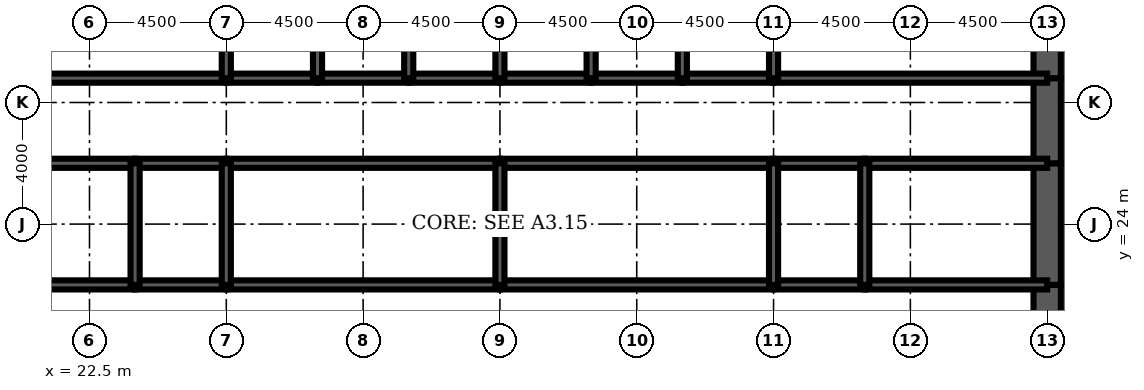
"""IFC4 building model, lengths in metres.
Left out: names, types, materials, properties, quantities, classifications, styles, units other than length and angle.
Written with IfcOpenShell. Run it as: python <this file> out.ifc"""

import sys

from ifc_helpers import new_model, si_unit, direction, frame, frame_2d, origin, place, context, subcontext, project, spatial, rectangle, extrude, element, fill, save


model = new_model("IFC4")
c1 = context("Model", 3, precision=1e-05, world=origin(), true_north=direction((0.0, 1.0)))
c2 = subcontext(c1, "Body", "Model", "MODEL_VIEW")
j1 = project(units=[si_unit("LENGTHUNIT", "METRE"), si_unit("PLANEANGLEUNIT", "RADIAN")], contexts=[c1])
p1 = place(None, origin())
s1 = spatial("IfcSite", under=j1, at=p1, CompositionType="ELEMENT")
p2 = place(p1, origin())
s2 = spatial("IfcBuilding", under=s1, at=p2, CompositionType="ELEMENT")
p3 = place(p2, frame((0.0, 0.0, 63.5)))
s3 = spatial("IfcBuildingStorey", under=s2, at=p3, CompositionType="ELEMENT", Elevation=63.5)
p4 = place(p3, frame((54.0, 19.2, 0.0), z_axis=(0.0, 0.0, 1.0), x_axis=(0.0, 1.0, 0.0)))
e1 = element("IfcWall", 1, at=p4, inside=s3, PredefinedType="SHEAR", context=c2, shape_type="SweptSolid", body=[
    extrude(rectangle(XDim=2.8, YDim=0.9, at=frame_2d((1.4, 0.0))), origin(), (0.0, 0.0, 1.0), 4.5),
])
p5 = place(p4, frame((0.4, 0.0, 0.0)))
e2 = element("IfcOpeningElement", 2, at=p5, cuts=e1, PredefinedType="OPENING", context=c2, shape_type="SweptSolid", body=[
    extrude(rectangle(XDim=1.8, YDim=2.1, at=frame_2d((0.9, 1.05))), frame((0.0, 0.46, 0.0), z_axis=(0.0, -1.0, 0.0), x_axis=(1.0, 0.0, 0.0)), (0.0, 0.0, 1.0), 0.92),
])
p6 = place(p3, frame((54.0, 22.0, 0.0), z_axis=(0.0, 0.0, 1.0), x_axis=(0.0, 1.0, 0.0)))
e3 = element("IfcWall", 3, at=p6, inside=s3, PredefinedType="SHEAR", context=c2, shape_type="SweptSolid", body=[
    extrude(rectangle(XDim=4.0, YDim=0.9, at=frame_2d((2.0, 0.0))), origin(), (0.0, 0.0, 1.0), 4.5),
])
p7 = place(p3, frame((54.0, 26.0, 0.0), z_axis=(0.0, 0.0, 1.0), x_axis=(0.0, 1.0, 0.0)))
e4 = element("IfcWall", 4, at=p7, inside=s3, PredefinedType="SHEAR", context=c2, shape_type="SweptSolid", body=[
    extrude(rectangle(XDim=2.8, YDim=0.9, at=frame_2d((1.4, 0.0))), origin(), (0.0, 0.0, 1.0), 4.5),
])
p8 = place(p7, frame((0.6, 0.0, 0.0)))
e5 = element("IfcOpeningElement", 5, at=p8, cuts=e4, PredefinedType="OPENING", context=c2, shape_type="SweptSolid", body=[
    extrude(rectangle(XDim=1.8, YDim=2.1, at=frame_2d((0.9, 1.05))), frame((0.0, 0.46, 0.0), z_axis=(0.0, -1.0, 0.0), x_axis=(1.0, 0.0, 0.0)), (0.0, 0.0, 1.0), 0.92),
])
p9 = place(p3, frame((54.0, 28.8, 0.0), z_axis=(0.0, 0.0, 1.0), x_axis=(0.0, 1.0, 0.0)))
e6 = element("IfcWall", 6, at=p9, inside=s3, PredefinedType="SHEAR", context=c2, shape_type="SweptSolid", body=[
    extrude(rectangle(XDim=3.2, YDim=0.9, at=frame_2d((1.6, 0.0))), origin(), (0.0, 0.0, 1.0), 4.5),
])
p10 = place(p3, frame((18.0, 28.8, 0.0), z_axis=(0.0, 0.0, 1.0), x_axis=(1.0, 0.0, 0.0)))
e7 = element("IfcWall", 7, at=p10, inside=s3, PredefinedType="SOLIDWALL", context=c2, shape_type="SweptSolid", body=[
    extrude(rectangle(XDim=9.0, YDim=0.3, at=frame_2d((4.5, 0.0))), origin(), (0.0, 0.0, 1.0), 4.5),
])
p11 = place(p10, frame((0.65, 0.0, 0.0)))
e8 = element("IfcOpeningElement", 8, at=p11, cuts=e7, PredefinedType="OPENING", context=c2, shape_type="SweptSolid", body=[
    extrude(rectangle(XDim=1.0, YDim=2.1, at=frame_2d((0.5, 1.05))), frame((0.0, 0.16, 0.0), z_axis=(0.0, -1.0, 0.0), x_axis=(1.0, 0.0, 0.0)), (0.0, 0.0, 1.0), 0.32),
])
p12 = place(p3, frame((27.0, 28.8, 0.0), z_axis=(0.0, 0.0, 1.0), x_axis=(1.0, 0.0, 0.0)))
e9 = element("IfcWall", 9, at=p12, inside=s3, PredefinedType="SOLIDWALL", context=c2, shape_type="SweptSolid", body=[
    extrude(rectangle(XDim=3.0, YDim=0.3, at=frame_2d((1.5, 0.0))), origin(), (0.0, 0.0, 1.0), 4.5),
])
p13 = place(p12, frame((0.95, 0.0, 0.0)))
e10 = element("IfcOpeningElement", 10, at=p13, cuts=e9, PredefinedType="OPENING", context=c2, shape_type="SweptSolid", body=[
    extrude(rectangle(XDim=1.1, YDim=2.2, at=frame_2d((0.55, 1.1))), frame((0.0, 0.16, 0.0), z_axis=(0.0, -1.0, 0.0), x_axis=(1.0, 0.0, 0.0)), (0.0, 0.0, 1.0), 0.32),
])
p14 = place(p3, frame((30.0, 28.8, 0.0), z_axis=(0.0, 0.0, 1.0), x_axis=(1.0, 0.0, 0.0)))
e11 = element("IfcWall", 11, at=p14, inside=s3, PredefinedType="SOLIDWALL", context=c2, shape_type="SweptSolid", body=[
    extrude(rectangle(XDim=3.0, YDim=0.3, at=frame_2d((1.5, 0.0))), origin(), (0.0, 0.0, 1.0), 4.5),
])
p15 = place(p14, frame((0.95, 0.0, 0.0)))
e12 = element("IfcOpeningElement", 12, at=p15, cuts=e11, PredefinedType="OPENING", context=c2, shape_type="SweptSolid", body=[
    extrude(rectangle(XDim=1.1, YDim=2.2, at=frame_2d((0.55, 1.1))), frame((0.0, 0.16, 0.0), z_axis=(0.0, -1.0, 0.0), x_axis=(1.0, 0.0, 0.0)), (0.0, 0.0, 1.0), 0.32),
])
p16 = place(p3, frame((33.0, 28.8, 0.0), z_axis=(0.0, 0.0, 1.0), x_axis=(1.0, 0.0, 0.0)))
e13 = element("IfcWall", 13, at=p16, inside=s3, PredefinedType="SOLIDWALL", context=c2, shape_type="SweptSolid", body=[
    extrude(rectangle(XDim=3.0, YDim=0.3, at=frame_2d((1.5, 0.0))), origin(), (0.0, 0.0, 1.0), 4.5),
])
p17 = place(p16, frame((0.95, 0.0, 0.0)))
e14 = element("IfcOpeningElement", 14, at=p17, cuts=e13, PredefinedType="OPENING", context=c2, shape_type="SweptSolid", body=[
    extrude(rectangle(XDim=1.1, YDim=2.2, at=frame_2d((0.55, 1.1))), frame((0.0, 0.16, 0.0), z_axis=(0.0, -1.0, 0.0), x_axis=(1.0, 0.0, 0.0)), (0.0, 0.0, 1.0), 0.32),
])
for number, where, z_axis, x_axis in (
    (15, (36.0, 28.8, 0.0), (0.0, 0.0, 1.0), (1.0, 0.0, 0.0)),
    (16, (39.0, 28.8, 0.0), (0.0, 0.0, 1.0), (1.0, 0.0, 0.0)),
):
    element("IfcWall", number, at=place(p3, frame(where, z_axis=z_axis, x_axis=x_axis)), inside=s3, PredefinedType="SOLIDWALL", context=c2, shape_type="SweptSolid", body=[
        extrude(rectangle(XDim=3.0, YDim=0.3, at=frame_2d((1.5, 0.0))), origin(), (0.0, 0.0, 1.0), 4.5),
    ])
p18 = place(p3, frame((42.0, 28.8, 0.0), z_axis=(0.0, 0.0, 1.0), x_axis=(1.0, 0.0, 0.0)))
e17 = element("IfcWall", 17, at=p18, inside=s3, PredefinedType="SOLIDWALL", context=c2, shape_type="SweptSolid", body=[
    extrude(rectangle(XDim=3.0, YDim=0.3, at=frame_2d((1.5, 0.0))), origin(), (0.0, 0.0, 1.0), 4.5),
])
p19 = place(p18, frame((0.95, 0.0, 0.0)))
e18 = element("IfcOpeningElement", 18, at=p19, cuts=e17, PredefinedType="OPENING", context=c2, shape_type="SweptSolid", body=[
    extrude(rectangle(XDim=1.1, YDim=2.2, at=frame_2d((0.55, 1.1))), frame((0.0, 0.16, 0.0), z_axis=(0.0, -1.0, 0.0), x_axis=(1.0, 0.0, 0.0)), (0.0, 0.0, 1.0), 0.32),
])
p20 = place(p3, frame((45.0, 28.8, 0.0), z_axis=(0.0, 0.0, 1.0), x_axis=(1.0, 0.0, 0.0)))
e19 = element("IfcWall", 19, at=p20, inside=s3, PredefinedType="SOLIDWALL", context=c2, shape_type="SweptSolid", body=[
    extrude(rectangle(XDim=9.0, YDim=0.3, at=frame_2d((4.5, 0.0))), origin(), (0.0, 0.0, 1.0), 4.5),
])
p21 = place(p20, frame((7.35, 0.0, 0.0)))
e20 = element("IfcOpeningElement", 20, at=p21, cuts=e19, PredefinedType="OPENING", context=c2, shape_type="SweptSolid", body=[
    extrude(rectangle(XDim=1.0, YDim=2.1, at=frame_2d((0.5, 1.05))), frame((0.0, 0.16, 0.0), z_axis=(0.0, -1.0, 0.0), x_axis=(1.0, 0.0, 0.0)), (0.0, 0.0, 1.0), 0.32),
])
p22 = place(p3, frame((18.0, 22.0, 0.0), z_axis=(0.0, 0.0, 1.0), x_axis=(1.0, 0.0, 0.0)))
e21 = element("IfcWall", 21, at=p22, inside=s3, PredefinedType="SOLIDWALL", context=c2, shape_type="SweptSolid", body=[
    extrude(rectangle(XDim=6.0, YDim=0.3, at=frame_2d((3.0, 0.0))), origin(), (0.0, 0.0, 1.0), 4.5),
])
p23 = place(p22, frame((2.0, 0.0, 0.0)))
e22 = element("IfcOpeningElement", 22, at=p23, cuts=e21, PredefinedType="OPENING", context=c2, shape_type="SweptSolid", body=[
    extrude(rectangle(XDim=1.0, YDim=2.1, at=frame_2d((0.5, 1.05))), frame((0.0, 0.16, 0.0), z_axis=(0.0, -1.0, 0.0), x_axis=(1.0, 0.0, 0.0)), (0.0, 0.0, 1.0), 0.32),
])
p24 = place(p3, frame((24.0, 22.0, 0.0), z_axis=(0.0, 0.0, 1.0), x_axis=(1.0, 0.0, 0.0)))
e23 = element("IfcWall", 23, at=p24, inside=s3, PredefinedType="SOLIDWALL", context=c2, shape_type="SweptSolid", body=[
    extrude(rectangle(XDim=3.0, YDim=0.3, at=frame_2d((1.5, 0.0))), origin(), (0.0, 0.0, 1.0), 4.5),
])
p25 = place(p24, frame((1.0, 0.0, 0.0)))
e24 = element("IfcOpeningElement", 24, at=p25, cuts=e23, PredefinedType="OPENING", context=c2, shape_type="SweptSolid", body=[
    extrude(rectangle(XDim=1.0, YDim=2.1, at=frame_2d((0.5, 1.05))), frame((0.0, 0.16, 0.0), z_axis=(0.0, -1.0, 0.0), x_axis=(1.0, 0.0, 0.0)), (0.0, 0.0, 1.0), 0.32),
])
p26 = place(p3, frame((27.0, 22.0, 0.0), z_axis=(0.0, 0.0, 1.0), x_axis=(1.0, 0.0, 0.0)))
e25 = element("IfcWall", 25, at=p26, inside=s3, PredefinedType="SOLIDWALL", context=c2, shape_type="SweptSolid", body=[
    extrude(rectangle(XDim=9.0, YDim=0.3, at=frame_2d((4.5, 0.0))), origin(), (0.0, 0.0, 1.0), 4.5),
])
p27 = place(p26, frame((4.0, 0.0, 0.0)))
e26 = element("IfcOpeningElement", 26, at=p27, cuts=e25, PredefinedType="OPENING", context=c2, shape_type="SweptSolid", body=[
    extrude(rectangle(XDim=1.0, YDim=2.1, at=frame_2d((0.5, 1.05))), frame((0.0, 0.16, 0.0), z_axis=(0.0, -1.0, 0.0), x_axis=(1.0, 0.0, 0.0)), (0.0, 0.0, 1.0), 0.32),
])
p28 = place(p3, frame((36.0, 22.0, 0.0), z_axis=(0.0, 0.0, 1.0), x_axis=(1.0, 0.0, 0.0)))
e27 = element("IfcWall", 27, at=p28, inside=s3, PredefinedType="SOLIDWALL", context=c2, shape_type="SweptSolid", body=[
    extrude(rectangle(XDim=9.0, YDim=0.3, at=frame_2d((4.5, 0.0))), origin(), (0.0, 0.0, 1.0), 4.5),
])
p29 = place(p28, frame((4.0, 0.0, 0.0)))
e28 = element("IfcOpeningElement", 28, at=p29, cuts=e27, PredefinedType="OPENING", context=c2, shape_type="SweptSolid", body=[
    extrude(rectangle(XDim=1.0, YDim=2.1, at=frame_2d((0.5, 1.05))), frame((0.0, 0.16, 0.0), z_axis=(0.0, -1.0, 0.0), x_axis=(1.0, 0.0, 0.0)), (0.0, 0.0, 1.0), 0.32),
])
p30 = place(p3, frame((45.0, 22.0, 0.0), z_axis=(0.0, 0.0, 1.0), x_axis=(1.0, 0.0, 0.0)))
e29 = element("IfcWall", 29, at=p30, inside=s3, PredefinedType="SOLIDWALL", context=c2, shape_type="SweptSolid", body=[
    extrude(rectangle(XDim=3.0, YDim=0.3, at=frame_2d((1.5, 0.0))), origin(), (0.0, 0.0, 1.0), 4.5),
])
p31 = place(p30, frame((1.0, 0.0, 0.0)))
e30 = element("IfcOpeningElement", 30, at=p31, cuts=e29, PredefinedType="OPENING", context=c2, shape_type="SweptSolid", body=[
    extrude(rectangle(XDim=1.0, YDim=2.1, at=frame_2d((0.5, 1.05))), frame((0.0, 0.16, 0.0), z_axis=(0.0, -1.0, 0.0), x_axis=(1.0, 0.0, 0.0)), (0.0, 0.0, 1.0), 0.32),
])
p32 = place(p3, frame((48.0, 22.0, 0.0), z_axis=(0.0, 0.0, 1.0), x_axis=(1.0, 0.0, 0.0)))
e31 = element("IfcWall", 31, at=p32, inside=s3, PredefinedType="SOLIDWALL", context=c2, shape_type="SweptSolid", body=[
    extrude(rectangle(XDim=6.0, YDim=0.3, at=frame_2d((3.0, 0.0))), origin(), (0.0, 0.0, 1.0), 4.5),
])
p33 = place(p32, frame((2.0, 0.0, 0.0)))
e32 = element("IfcOpeningElement", 32, at=p33, cuts=e31, PredefinedType="OPENING", context=c2, shape_type="SweptSolid", body=[
    extrude(rectangle(XDim=1.0, YDim=2.1, at=frame_2d((0.5, 1.05))), frame((0.0, 0.16, 0.0), z_axis=(0.0, -1.0, 0.0), x_axis=(1.0, 0.0, 0.0)), (0.0, 0.0, 1.0), 0.32),
])
p34 = place(p32, frame((4.0, 0.0, 0.0)))
e33 = element("IfcOpeningElement", 33, at=p34, cuts=e31, PredefinedType="OPENING", context=c2, shape_type="SweptSolid", body=[
    extrude(rectangle(XDim=1.0, YDim=2.1, at=frame_2d((0.5, 1.05))), frame((0.0, 0.16, 0.0), z_axis=(0.0, -1.0, 0.0), x_axis=(1.0, 0.0, 0.0)), (0.0, 0.0, 1.0), 0.32),
])
p35 = place(p3, frame((18.0, 26.0, 0.0), z_axis=(0.0, 0.0, 1.0), x_axis=(1.0, 0.0, 0.0)))
e34 = element("IfcWall", 34, at=p35, inside=s3, PredefinedType="SOLIDWALL", context=c2, shape_type="SweptSolid", body=[
    extrude(rectangle(XDim=6.0, YDim=0.3, at=frame_2d((3.0, 0.0))), origin(), (0.0, 0.0, 1.0), 4.5),
])
p36 = place(p3, frame((24.0, 26.0, 0.0), z_axis=(0.0, 0.0, 1.0), x_axis=(1.0, 0.0, 0.0)))
e35 = element("IfcWall", 35, at=p36, inside=s3, PredefinedType="SOLIDWALL", context=c2, shape_type="SweptSolid", body=[
    extrude(rectangle(XDim=3.0, YDim=0.3, at=frame_2d((1.5, 0.0))), origin(), (0.0, 0.0, 1.0), 4.5),
])
for number, where, z_axis, x_axis in (
    (36, (27.0, 26.0, 0.0), (0.0, 0.0, 1.0), (1.0, 0.0, 0.0)),
    (37, (36.0, 26.0, 0.0), (0.0, 0.0, 1.0), (1.0, 0.0, 0.0)),
):
    element("IfcWall", number, at=place(p3, frame(where, z_axis=z_axis, x_axis=x_axis)), inside=s3, PredefinedType="SOLIDWALL", context=c2, shape_type="SweptSolid", body=[
        extrude(rectangle(XDim=9.0, YDim=0.3, at=frame_2d((4.5, 0.0))), origin(), (0.0, 0.0, 1.0), 4.5),
    ])
p37 = place(p3, frame((45.0, 26.0, 0.0), z_axis=(0.0, 0.0, 1.0), x_axis=(1.0, 0.0, 0.0)))
e38 = element("IfcWall", 38, at=p37, inside=s3, PredefinedType="SOLIDWALL", context=c2, shape_type="SweptSolid", body=[
    extrude(rectangle(XDim=3.0, YDim=0.3, at=frame_2d((1.5, 0.0))), origin(), (0.0, 0.0, 1.0), 4.5),
])
p38 = place(p3, frame((48.0, 26.0, 0.0), z_axis=(0.0, 0.0, 1.0), x_axis=(1.0, 0.0, 0.0)))
e39 = element("IfcWall", 39, at=p38, inside=s3, PredefinedType="SOLIDWALL", context=c2, shape_type="SweptSolid", body=[
    extrude(rectangle(XDim=6.0, YDim=0.3, at=frame_2d((3.0, 0.0))), origin(), (0.0, 0.0, 1.0), 4.5),
])
for number, where, z_axis, x_axis in (
    (40, (27.0, 28.8, 0.0), (0.0, 0.0, 1.0), (0.0, 1.0, 0.0)),
    (41, (30.0, 28.8, 0.0), (0.0, 0.0, 1.0), (0.0, 1.0, 0.0)),
    (42, (33.0, 28.8, 0.0), (0.0, 0.0, 1.0), (0.0, 1.0, 0.0)),
    (43, (36.0, 28.8, 0.0), (0.0, 0.0, 1.0), (0.0, 1.0, 0.0)),
    (44, (39.0, 28.8, 0.0), (0.0, 0.0, 1.0), (0.0, 1.0, 0.0)),
    (45, (42.0, 28.8, 0.0), (0.0, 0.0, 1.0), (0.0, 1.0, 0.0)),
    (46, (45.0, 28.8, 0.0), (0.0, 0.0, 1.0), (0.0, 1.0, 0.0)),
):
    element("IfcWall", number, at=place(p3, frame(where, z_axis=z_axis, x_axis=x_axis)), inside=s3, PredefinedType="SOLIDWALL", context=c2, shape_type="SweptSolid", body=[
        extrude(rectangle(XDim=3.2, YDim=0.3, at=frame_2d((1.6, 0.0))), origin(), (0.0, 0.0, 1.0), 4.5),
    ])
for number, where, z_axis, x_axis in (
    (47, (24.0, 22.0, 0.0), (0.0, 0.0, 1.0), (0.0, 1.0, 0.0)),
    (48, (27.0, 22.0, 0.0), (0.0, 0.0, 1.0), (0.0, 1.0, 0.0)),
    (49, (36.0, 22.0, 0.0), (0.0, 0.0, 1.0), (0.0, 1.0, 0.0)),
    (50, (45.0, 22.0, 0.0), (0.0, 0.0, 1.0), (0.0, 1.0, 0.0)),
    (51, (48.0, 22.0, 0.0), (0.0, 0.0, 1.0), (0.0, 1.0, 0.0)),
):
    element("IfcWall", number, at=place(p3, frame(where, z_axis=z_axis, x_axis=x_axis)), inside=s3, PredefinedType="SOLIDWALL", context=c2, shape_type="SweptSolid", body=[
        extrude(rectangle(XDim=4.0, YDim=0.3, at=frame_2d((2.0, 0.0))), origin(), (0.0, 0.0, 1.0), 4.5),
    ])
p39 = place(p3, frame((38.5, 22.15, 0.0), z_axis=(0.0, 0.0, 1.0), x_axis=(0.0, 1.0, 0.0)))
e52 = element("IfcWall", 52, at=p39, inside=s3, PredefinedType="PARTITIONING", context=c2, shape_type="SweptSolid", body=[
    extrude(rectangle(XDim=3.7, YDim=0.15, at=frame_2d((1.85, 0.0))), origin(), (0.0, 0.0, 1.0), 3.0),
])
p40 = place(p39, frame((2.2, 0.0, 0.0)))
e53 = element("IfcOpeningElement", 53, at=p40, cuts=e52, PredefinedType="OPENING", context=c2, shape_type="SweptSolid", body=[
    extrude(rectangle(XDim=1.0, YDim=2.1, at=frame_2d((0.5, 1.05))), frame((0.0, 0.085, 0.0), z_axis=(0.0, -1.0, 0.0), x_axis=(1.0, 0.0, 0.0)), (0.0, 0.0, 1.0), 0.17),
])
p41 = place(p3, frame((51.375, 22.15, 0.0), z_axis=(0.0, 0.0, 1.0), x_axis=(0.0, 1.0, 0.0)))
e54 = element("IfcWall", 54, at=p41, inside=s3, PredefinedType="PARTITIONING", context=c2, shape_type="SweptSolid", body=[
    extrude(rectangle(XDim=3.7, YDim=0.15, at=frame_2d((1.85, 0.0))), origin(), (0.0, 0.0, 1.0), 3.0),
])
p42 = place(p3, frame((22.2, 26.15, 0.0), z_axis=(0.0, 0.0, 1.0), x_axis=(0.0, 1.0, 0.0)))
e55 = element("IfcWall", 55, at=p42, inside=s3, PredefinedType="PARTITIONING", context=c2, shape_type="SweptSolid", body=[
    extrude(rectangle(XDim=2.5, YDim=0.15, at=frame_2d((1.25, 0.0))), origin(), (0.0, 0.0, 1.0), 3.0),
])
p43 = place(p42, frame((0.35, 0.0, 0.0)))
e56 = element("IfcOpeningElement", 56, at=p43, cuts=e55, PredefinedType="OPENING", context=c2, shape_type="SweptSolid", body=[
    extrude(rectangle(XDim=1.0, YDim=2.1, at=frame_2d((0.5, 1.05))), frame((0.0, 0.085, 0.0), z_axis=(0.0, -1.0, 0.0), x_axis=(1.0, 0.0, 0.0)), (0.0, 0.0, 1.0), 0.17),
])
p44 = place(p40, origin())
e57 = element("IfcDoor", 57, at=p44, inside=s3, OperationType="SINGLE_SWING_RIGHT", PredefinedType="DOOR", context=c2, shape_type="SweptSolid", body=[
    extrude(rectangle(XDim=1.0, YDim=2.1, at=frame_2d((0.5, 1.05))), frame((0.0, 0.025, 0.0), z_axis=(0.0, -1.0, 0.0), x_axis=(1.0, 0.0, 0.0)), (0.0, 0.0, 1.0), 0.05),
])
fill(e53, e57)
p45 = place(p43, origin())
e58 = element("IfcDoor", 58, at=p45, inside=s3, OperationType="SINGLE_SWING_LEFT", PredefinedType="DOOR", context=c2, shape_type="SweptSolid", body=[
    extrude(rectangle(XDim=1.0, YDim=2.1, at=frame_2d((0.5, 1.05))), frame((0.0, 0.025, 0.0), z_axis=(0.0, -1.0, 0.0), x_axis=(1.0, 0.0, 0.0)), (0.0, 0.0, 1.0), 0.05),
])
fill(e56, e58)
p46 = place(p19, origin())
e59 = element("IfcDoor", 59, at=p46, inside=s3, OperationType="DOUBLE_DOOR_SLIDING", PredefinedType="USERDEFINED", context=c2, shape_type="SweptSolid", body=[
    extrude(rectangle(XDim=1.1, YDim=2.2, at=frame_2d((0.55, 1.1))), frame((0.0, 0.025, 0.0), z_axis=(0.0, -1.0, 0.0), x_axis=(1.0, 0.0, 0.0)), (0.0, 0.0, 1.0), 0.05),
])
fill(e18, e59)
p47 = place(p13, origin())
e60 = element("IfcDoor", 60, at=p47, inside=s3, OperationType="DOUBLE_DOOR_SLIDING", PredefinedType="USERDEFINED", context=c2, shape_type="SweptSolid", body=[
    extrude(rectangle(XDim=1.1, YDim=2.2, at=frame_2d((0.55, 1.1))), frame((0.0, 0.025, 0.0), z_axis=(0.0, -1.0, 0.0), x_axis=(1.0, 0.0, 0.0)), (0.0, 0.0, 1.0), 0.05),
])
fill(e10, e60)
p48 = place(p15, origin())
e61 = element("IfcDoor", 61, at=p48, inside=s3, OperationType="DOUBLE_DOOR_SLIDING", PredefinedType="USERDEFINED", context=c2, shape_type="SweptSolid", body=[
    extrude(rectangle(XDim=1.1, YDim=2.2, at=frame_2d((0.55, 1.1))), frame((0.0, 0.025, 0.0), z_axis=(0.0, -1.0, 0.0), x_axis=(1.0, 0.0, 0.0)), (0.0, 0.0, 1.0), 0.05),
])
fill(e12, e61)
p49 = place(p17, origin())
e62 = element("IfcDoor", 62, at=p49, inside=s3, OperationType="DOUBLE_DOOR_SLIDING", PredefinedType="USERDEFINED", context=c2, shape_type="SweptSolid", body=[
    extrude(rectangle(XDim=1.1, YDim=2.2, at=frame_2d((0.55, 1.1))), frame((0.0, 0.025, 0.0), z_axis=(0.0, -1.0, 0.0), x_axis=(1.0, 0.0, 0.0)), (0.0, 0.0, 1.0), 0.05),
])
fill(e14, e62)
p50 = place(p21, origin())
e63 = element("IfcDoor", 63, at=p50, inside=s3, OperationType="SINGLE_SWING_RIGHT", PredefinedType="DOOR", context=c2, shape_type="SweptSolid", body=[
    extrude(rectangle(XDim=1.0, YDim=2.1, at=frame_2d((0.5, 1.05))), frame((0.0, 0.025, 0.0), z_axis=(0.0, -1.0, 0.0), x_axis=(1.0, 0.0, 0.0)), (0.0, 0.0, 1.0), 0.05),
])
fill(e20, e63)
p51 = place(p5, origin())
e64 = element("IfcDoor", 64, at=p51, inside=s3, OperationType="SINGLE_SWING_LEFT", PredefinedType="DOOR", context=c2, shape_type="SweptSolid", body=[
    extrude(rectangle(XDim=1.8, YDim=2.1, at=frame_2d((0.9, 1.05))), frame((0.0, 0.45, 0.0), z_axis=(0.0, -1.0, 0.0), x_axis=(1.0, 0.0, 0.0)), (0.0, 0.0, 1.0), 0.899),
])
fill(e2, e64)
p52 = place(p8, origin())
e65 = element("IfcDoor", 65, at=p52, inside=s3, OperationType="SINGLE_SWING_LEFT", PredefinedType="DOOR", context=c2, shape_type="SweptSolid", body=[
    extrude(rectangle(XDim=1.8, YDim=2.1, at=frame_2d((0.9, 1.05))), frame((0.0, 0.45, 0.0), z_axis=(0.0, -1.0, 0.0), x_axis=(1.0, 0.0, 0.0)), (0.0, 0.0, 1.0), 0.899),
])
fill(e5, e65)
p53 = place(p25, origin())
e66 = element("IfcDoor", 66, at=p53, inside=s3, OperationType="SINGLE_SWING_LEFT", PredefinedType="DOOR", context=c2, shape_type="SweptSolid", body=[
    extrude(rectangle(XDim=1.0, YDim=2.1, at=frame_2d((0.5, 1.05))), frame((0.0, 0.025, 0.0), z_axis=(0.0, -1.0, 0.0), x_axis=(1.0, 0.0, 0.0)), (0.0, 0.0, 1.0), 0.05),
])
fill(e24, e66)
p54 = place(p27, origin())
e67 = element("IfcDoor", 67, at=p54, inside=s3, OperationType="SINGLE_SWING_LEFT", PredefinedType="DOOR", context=c2, shape_type="SweptSolid", body=[
    extrude(rectangle(XDim=1.0, YDim=2.1, at=frame_2d((0.5, 1.05))), frame((0.0, 0.025, 0.0), z_axis=(0.0, -1.0, 0.0), x_axis=(1.0, 0.0, 0.0)), (0.0, 0.0, 1.0), 0.05),
])
fill(e26, e67)
p55 = place(p29, origin())
e68 = element("IfcDoor", 68, at=p55, inside=s3, OperationType="SINGLE_SWING_LEFT", PredefinedType="DOOR", context=c2, shape_type="SweptSolid", body=[
    extrude(rectangle(XDim=1.0, YDim=2.1, at=frame_2d((0.5, 1.05))), frame((0.0, 0.025, 0.0), z_axis=(0.0, -1.0, 0.0), x_axis=(1.0, 0.0, 0.0)), (0.0, 0.0, 1.0), 0.05),
])
fill(e28, e68)
p56 = place(p31, origin())
e69 = element("IfcDoor", 69, at=p56, inside=s3, OperationType="SINGLE_SWING_LEFT", PredefinedType="DOOR", context=c2, shape_type="SweptSolid", body=[
    extrude(rectangle(XDim=1.0, YDim=2.1, at=frame_2d((0.5, 1.05))), frame((0.0, 0.025, 0.0), z_axis=(0.0, -1.0, 0.0), x_axis=(1.0, 0.0, 0.0)), (0.0, 0.0, 1.0), 0.05),
])
fill(e30, e69)
p57 = place(p33, origin())
e70 = element("IfcDoor", 70, at=p57, inside=s3, OperationType="SINGLE_SWING_LEFT", PredefinedType="DOOR", context=c2, shape_type="SweptSolid", body=[
    extrude(rectangle(XDim=1.0, YDim=2.1, at=frame_2d((0.5, 1.05))), frame((0.0, 0.025, 0.0), z_axis=(0.0, -1.0, 0.0), x_axis=(1.0, 0.0, 0.0)), (0.0, 0.0, 1.0), 0.05),
])
fill(e32, e70)
p58 = place(p34, origin())
e71 = element("IfcDoor", 71, at=p58, inside=s3, OperationType="SINGLE_SWING_RIGHT", PredefinedType="DOOR", context=c2, shape_type="SweptSolid", body=[
    extrude(rectangle(XDim=1.0, YDim=2.1, at=frame_2d((0.5, 1.05))), frame((0.0, 0.025, 0.0), z_axis=(0.0, -1.0, 0.0), x_axis=(1.0, 0.0, 0.0)), (0.0, 0.0, 1.0), 0.05),
])
fill(e33, e71)
save(model, sys.argv[1])
